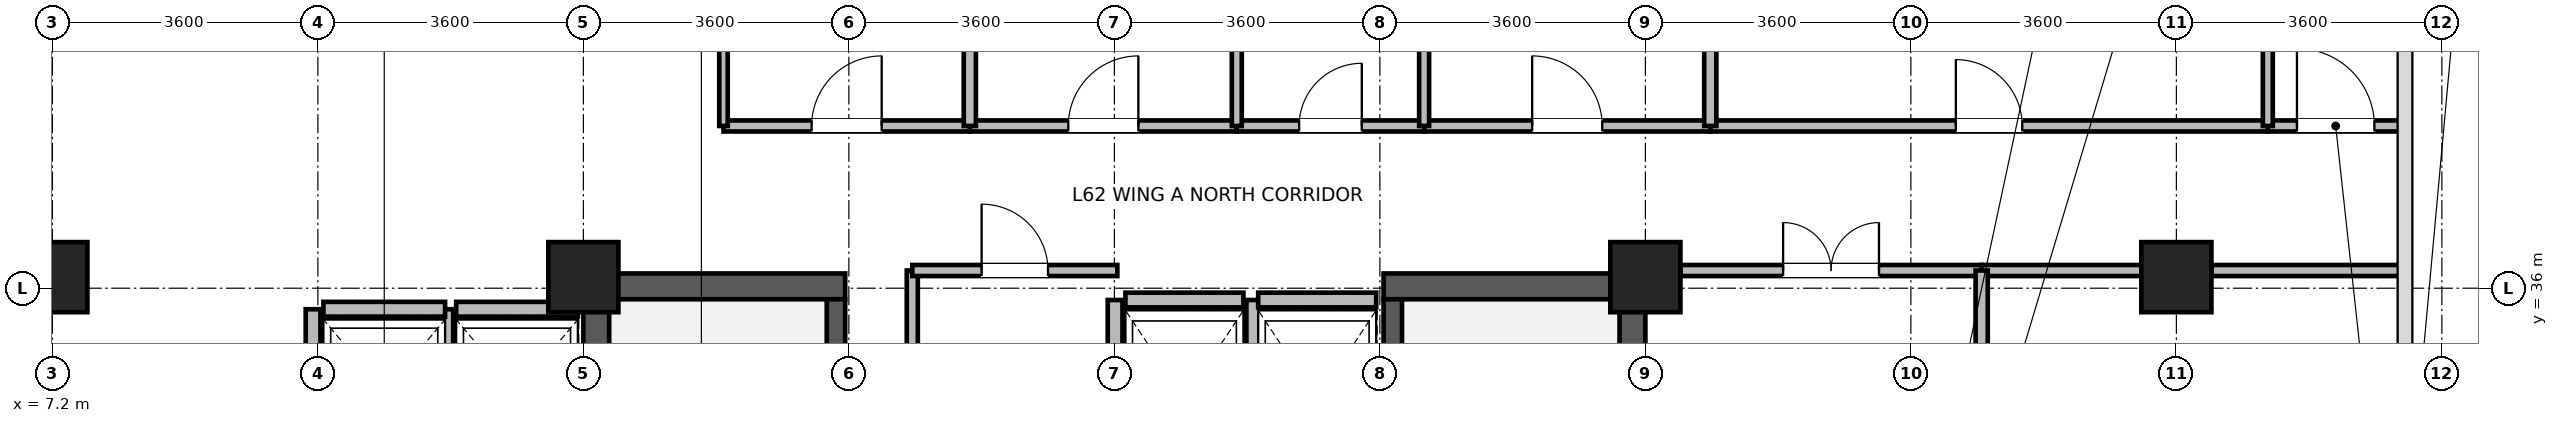
"""IFC4 building model, lengths in metres.
Left out: names, types, materials, properties, quantities, classifications, styles, units other than length and angle.
Written with IfcOpenShell. Run it as: python <this file> out.ifc"""

import sys

from ifc_helpers import new_model, si_unit, direction, frame, frame_2d, origin, origin_2d, place, context, subcontext, project, spatial, rectangle, extrude, source, transform, mapped, element, fill, save


model = new_model("IFC4")
c1 = context("Model", 3, precision=1e-05, world=origin(), true_north=direction((0.0, 1.0)))
c2 = subcontext(c1, "Body", "Model", "MODEL_VIEW")
j1 = project(units=[si_unit("LENGTHUNIT", "METRE"), si_unit("PLANEANGLEUNIT", "RADIAN")], contexts=[c1])
p1 = place(None, origin())
s1 = spatial("IfcSite", under=j1, at=p1, CompositionType="ELEMENT")
p2 = place(p1, origin())
s2 = spatial("IfcBuilding", under=s1, at=p2, CompositionType="ELEMENT")
p3 = place(p2, frame((0.0, 0.0, 242.5)))
s3 = spatial("IfcBuildingStorey", under=s2, at=p3, CompositionType="ELEMENT", Elevation=242.5)
for number, where, z_axis, x_axis in (
    (1, (14.575, 28.5, 0.0), (0.0, 0.0, 1.0), (0.0, 1.0, 0.0)),
    (2, (28.625, 28.5, 0.0), (0.0, 0.0, 1.0), (0.0, 1.0, 0.0)),
):
    element("IfcWall", number, at=place(p3, frame(where, z_axis=z_axis, x_axis=x_axis)), inside=s3, PredefinedType="SHEAR", context=c2, shape_type="SweptSolid", body=[
        extrude(rectangle(XDim=7.7, YDim=0.35, at=frame_2d((3.85, 0.0))), origin(), (0.0, 0.0, 1.0), 3.44),
    ])
for number, where, z_axis, x_axis in (
    (3, (14.75, 36.025, 0.0), (0.0, 0.0, 1.0), (1.0, 0.0, 0.0)),
    (4, (25.25, 36.025, 0.0), (0.0, 0.0, 1.0), (1.0, 0.0, 0.0)),
):
    element("IfcWall", number, at=place(p3, frame(where, z_axis=z_axis, x_axis=x_axis)), inside=s3, PredefinedType="SHEAR", context=c2, shape_type="SweptSolid", body=[
        extrude(rectangle(XDim=3.2, YDim=0.35, at=frame_2d((1.6, 0.0))), origin(), (0.0, 0.0, 1.0), 3.44),
    ])
p4 = place(p3, frame((17.825, 28.85, 0.0), z_axis=(0.0, 0.0, 1.0), x_axis=(0.0, 1.0, 0.0)))
e5 = element("IfcWall", 5, at=p4, inside=s3, PredefinedType="SHEAR", context=c2, shape_type="SweptSolid", body=[
    extrude(rectangle(XDim=7.0, YDim=0.25, at=frame_2d((3.5, 0.0))), origin(), (0.0, 0.0, 1.0), 3.44),
])
p5 = place(p4, frame((0.15, 0.0, 0.0)))
e6 = element("IfcOpeningElement", 6, at=p5, cuts=e5, PredefinedType="OPENING", context=c2, shape_type="SweptSolid", body=[
    extrude(rectangle(XDim=1.1, YDim=2.08, at=frame_2d((0.55, 1.04))), frame((0.0, 0.135, 0.0), z_axis=(0.0, -1.0, 0.0), x_axis=(1.0, 0.0, 0.0)), (0.0, 0.0, 1.0), 0.27),
])
p6 = place(p3, frame((25.375, 28.85, 0.0), z_axis=(0.0, 0.0, 1.0), x_axis=(0.0, 1.0, 0.0)))
e7 = element("IfcWall", 7, at=p6, inside=s3, PredefinedType="SHEAR", context=c2, shape_type="SweptSolid", body=[
    extrude(rectangle(XDim=7.0, YDim=0.25, at=frame_2d((3.5, 0.0))), origin(), (0.0, 0.0, 1.0), 3.44),
])
p7 = place(p6, frame((0.15, 0.0, 0.0)))
e8 = element("IfcOpeningElement", 8, at=p7, cuts=e7, PredefinedType="OPENING", context=c2, shape_type="SweptSolid", body=[
    extrude(rectangle(XDim=1.1, YDim=2.08, at=frame_2d((0.55, 1.04))), frame((0.0, 0.135, 0.0), z_axis=(0.0, -1.0, 0.0), x_axis=(1.0, 0.0, 0.0)), (0.0, 0.0, 1.0), 0.27),
])
m1 = source(origin(), c2, "Body", "SweptSolid", [
    extrude(rectangle(XDim=0.95, YDim=0.95, at=origin_2d()), origin(), (0.0, 0.0, 1.0), 3.7),
])
for number, where, z_axis, x_axis in (
    (9, (7.2, 36.15, 0.0), (0.0, 0.0, 1.0), (1.0, 0.0, 0.0)),
    (10, (14.4, 36.15, 0.0), (0.0, 0.0, 1.0), (1.0, 0.0, 0.0)),
    (11, (28.8, 36.15, 0.0), (0.0, 0.0, 1.0), (1.0, 0.0, 0.0)),
    (12, (36.0, 36.15, 0.0), (0.0, 0.0, 1.0), (1.0, 0.0, 0.0)),
):
    element("IfcColumn", number, at=place(p3, frame(where, z_axis=z_axis, x_axis=x_axis)), inside=s3, PredefinedType="COLUMN", context=c2, shape_type="MappedRepresentation", body=[
        mapped(m1, transform((0.0, 0.0, 0.0), x_axis=(1.0, 0.0, 0.0), y_axis=(0.0, 1.0, 0.0), z_axis=(0.0, 0.0, 1.0), scale=1.0)),
    ])
p8 = place(p3, frame((12.675, 35.715, 0.0), z_axis=(0.0, 0.0, 1.0), x_axis=(1.0, 0.0, 0.0)))
e13 = element("IfcWall", 13, at=p8, inside=s3, PredefinedType="PARTITIONING", context=c2, shape_type="SweptSolid", body=[
    extrude(rectangle(XDim=1.65, YDim=0.2, at=frame_2d((0.825, 0.0))), origin(), (0.0, 0.0, 1.0), 3.42),
])
p9 = place(p3, frame((12.535, 33.485, 0.0), z_axis=(0.0, 0.0, 1.0), x_axis=(0.0, 1.0, 0.0)))
e14 = element("IfcWall", 14, at=p9, inside=s3, PredefinedType="PARTITIONING", context=c2, shape_type="SweptSolid", body=[
    extrude(rectangle(XDim=2.23, YDim=0.2, at=frame_2d((1.115, 0.0))), origin(), (0.0, 0.0, 1.0), 3.42),
])
p10 = place(p3, frame((10.875, 35.715, 0.0), z_axis=(0.0, 0.0, 1.0), x_axis=(1.0, 0.0, 0.0)))
e15 = element("IfcWall", 15, at=p10, inside=s3, PredefinedType="PARTITIONING", context=c2, shape_type="SweptSolid", body=[
    extrude(rectangle(XDim=1.65, YDim=0.2, at=frame_2d((0.825, 0.0))), origin(), (0.0, 0.0, 1.0), 3.42),
])
p11 = place(p3, frame((10.735, 33.485, 0.0), z_axis=(0.0, 0.0, 1.0), x_axis=(0.0, 1.0, 0.0)))
e16 = element("IfcWall", 16, at=p11, inside=s3, PredefinedType="PARTITIONING", context=c2, shape_type="SweptSolid", body=[
    extrude(rectangle(XDim=2.23, YDim=0.2, at=frame_2d((1.115, 0.0))), origin(), (0.0, 0.0, 1.0), 3.42),
])
p12 = place(p3, frame((21.75, 35.84, 0.0), z_axis=(0.0, 0.0, 1.0), x_axis=(1.0, 0.0, 0.0)))
e17 = element("IfcWall", 17, at=p12, inside=s3, PredefinedType="PARTITIONING", context=c2, shape_type="SweptSolid", body=[
    extrude(rectangle(XDim=1.6, YDim=0.2, at=frame_2d((0.8, 0.0))), origin(), (0.0, 0.0, 1.0), 2.52),
])
for number, where, z_axis, x_axis in (
    (18, (21.61, 33.16, 0.0), (0.0, 0.0, 1.0), (0.0, 1.0, 0.0)),
    (19, (23.49, 33.16, 0.0), (0.0, 0.0, 1.0), (0.0, 1.0, 0.0)),
):
    element("IfcWall", number, at=place(p3, frame(where, z_axis=z_axis, x_axis=x_axis)), inside=s3, PredefinedType="PARTITIONING", context=c2, shape_type="SweptSolid", body=[
        extrude(rectangle(XDim=2.68, YDim=0.2, at=frame_2d((1.34, 0.0))), origin(), (0.0, 0.0, 1.0), 3.42),
    ])
p13 = place(p3, frame((23.55, 35.84, 0.0), z_axis=(0.0, 0.0, 1.0), x_axis=(1.0, 0.0, 0.0)))
e20 = element("IfcWall", 20, at=p13, inside=s3, PredefinedType="PARTITIONING", context=c2, shape_type="SweptSolid", body=[
    extrude(rectangle(XDim=1.6, YDim=0.2, at=frame_2d((0.8, 0.0))), origin(), (0.0, 0.0, 1.0), 2.52),
])
p14 = place(p3, frame((29.68, 38.2, 0.0), z_axis=(0.0, 0.0, 1.0), x_axis=(1.0, 0.0, 0.0)))
e21 = element("IfcWall", 21, at=p14, inside=s3, PredefinedType="PARTITIONING", context=c2, shape_type="SweptSolid", body=[
    extrude(rectangle(XDim=7.56, YDim=0.15, at=frame_2d((3.78, 0.0))), origin(), (0.0, 0.0, 1.0), 3.42),
])
p15 = place(p14, frame((3.33, 0.0, 0.0)))
e22 = element("IfcOpeningElement", 22, at=p15, cuts=e21, PredefinedType="OPENING", context=c2, shape_type="SweptSolid", body=[
    extrude(rectangle(XDim=0.9, YDim=2.08, at=frame_2d((0.45, 1.04))), frame((0.0, 0.085, 0.0), z_axis=(0.0, -1.0, 0.0), x_axis=(1.0, 0.0, 0.0)), (0.0, 0.0, 1.0), 0.17),
])
p16 = place(p3, frame((33.36, 36.24, 0.0), z_axis=(0.0, 0.0, 1.0), x_axis=(1.0, 0.0, 0.0)))
e23 = element("IfcWall", 23, at=p16, inside=s3, PredefinedType="PARTITIONING", context=c2, shape_type="SweptSolid", body=[
    extrude(rectangle(XDim=2.165, YDim=0.15, at=frame_2d((1.083, 0.0))), origin(), (0.0, 0.0, 1.0), 2.87),
])
p17 = place(p3, frame((36.475, 36.24, 0.0), z_axis=(0.0, 0.0, 1.0), x_axis=(1.0, 0.0, 0.0)))
e24 = element("IfcWall", 24, at=p17, inside=s3, PredefinedType="PARTITIONING", context=c2, shape_type="SweptSolid", body=[
    extrude(rectangle(XDim=2.605, YDim=0.15, at=frame_2d((1.302, 0.0))), origin(), (0.0, 0.0, 1.0), 3.42),
])
p18 = place(p3, frame((29.275, 36.24, 0.0), z_axis=(0.0, 0.0, 1.0), x_axis=(1.0, 0.0, 0.0)))
e25 = element("IfcWall", 25, at=p18, inside=s3, PredefinedType="PARTITIONING", context=c2, shape_type="SweptSolid", body=[
    extrude(rectangle(XDim=4.085, YDim=0.15, at=frame_2d((2.042, 0.0))), origin(), (0.0, 0.0, 1.0), 2.87),
])
p19 = place(p18, frame((1.393, 0.0, 0.0)))
e26 = element("IfcOpeningElement", 26, at=p19, cuts=e25, PredefinedType="OPENING", context=c2, shape_type="SweptSolid", body=[
    extrude(rectangle(XDim=1.3, YDim=2.12, at=frame_2d((0.65, 1.06))), frame((0.0, 0.085, 0.0), z_axis=(0.0, -1.0, 0.0), x_axis=(1.0, 0.0, 0.0)), (0.0, 0.0, 1.0), 0.17),
])
p20 = place(p3, frame((25.8, 38.2, 0.0), z_axis=(0.0, 0.0, 1.0), x_axis=(1.0, 0.0, 0.0)))
e27 = element("IfcWall", 27, at=p20, inside=s3, PredefinedType="PARTITIONING", context=c2, shape_type="SweptSolid", body=[
    extrude(rectangle(XDim=3.88, YDim=0.15, at=frame_2d((1.94, 0.0))), origin(), (0.0, 0.0, 1.0), 3.42),
])
p21 = place(p20, frame((1.465, 0.0, 0.0)))
e28 = element("IfcOpeningElement", 28, at=p21, cuts=e27, PredefinedType="OPENING", context=c2, shape_type="SweptSolid", body=[
    extrude(rectangle(XDim=0.95, YDim=2.1, at=frame_2d((0.475, 1.05))), frame((0.0, 0.085, 0.0), z_axis=(0.0, -1.0, 0.0), x_axis=(1.0, 0.0, 0.0)), (0.0, 0.0, 1.0), 0.17),
])
p22 = place(p3, frame((19.64, 38.2, 0.0), z_axis=(0.0, 0.0, 1.0), x_axis=(1.0, 0.0, 0.0)))
e29 = element("IfcWall", 29, at=p22, inside=s3, PredefinedType="PARTITIONING", context=c2, shape_type="SweptSolid", body=[
    extrude(rectangle(XDim=3.62, YDim=0.15, at=frame_2d((1.81, 0.0))), origin(), (0.0, 0.0, 1.0), 3.42),
])
p23 = place(p22, frame((1.335, 0.0, 0.0)))
e30 = element("IfcOpeningElement", 30, at=p23, cuts=e29, PredefinedType="OPENING", context=c2, shape_type="SweptSolid", body=[
    extrude(rectangle(XDim=0.95, YDim=2.1, at=frame_2d((0.475, 1.05))), frame((0.0, 0.085, 0.0), z_axis=(0.0, -1.0, 0.0), x_axis=(1.0, 0.0, 0.0)), (0.0, 0.0, 1.0), 0.17),
])
p24 = place(p3, frame((16.3, 38.2, 0.0), z_axis=(0.0, 0.0, 1.0), x_axis=(1.0, 0.0, 0.0)))
e31 = element("IfcWall", 31, at=p24, inside=s3, PredefinedType="PARTITIONING", context=c2, shape_type="SweptSolid", body=[
    extrude(rectangle(XDim=3.34, YDim=0.15, at=frame_2d((1.67, 0.0))), origin(), (0.0, 0.0, 1.0), 3.42),
])
p25 = place(p24, frame((1.195, 0.0, 0.0)))
e32 = element("IfcOpeningElement", 32, at=p25, cuts=e31, PredefinedType="OPENING", context=c2, shape_type="SweptSolid", body=[
    extrude(rectangle(XDim=0.95, YDim=2.1, at=frame_2d((0.475, 1.05))), frame((0.0, 0.085, 0.0), z_axis=(0.0, -1.0, 0.0), x_axis=(1.0, 0.0, 0.0)), (0.0, 0.0, 1.0), 0.17),
])
p26 = place(p3, frame((18.86, 33.36, 0.0), z_axis=(0.0, 0.0, 1.0), x_axis=(0.0, 1.0, 0.0)))
e33 = element("IfcWall", 33, at=p26, inside=s3, PredefinedType="PARTITIONING", context=c2, shape_type="SweptSolid", body=[
    extrude(rectangle(XDim=2.88, YDim=0.15, at=frame_2d((1.44, 0.0))), origin(), (0.0, 0.0, 1.0), 3.42),
])
p27 = place(p3, frame((18.86, 36.24, 0.0), z_axis=(0.0, 0.0, 1.0), x_axis=(1.0, 0.0, 0.0)))
e34 = element("IfcWall", 34, at=p27, inside=s3, PredefinedType="PARTITIONING", context=c2, shape_type="SweptSolid", body=[
    extrude(rectangle(XDim=2.78, YDim=0.15, at=frame_2d((1.39, 0.0))), origin(), (0.0, 0.0, 1.0), 2.52),
])
p28 = place(p27, frame((0.94, 0.0, 0.0)))
e35 = element("IfcOpeningElement", 35, at=p28, cuts=e34, PredefinedType="OPENING", context=c2, shape_type="SweptSolid", body=[
    extrude(rectangle(XDim=0.9, YDim=2.08, at=frame_2d((0.45, 1.04))), frame((0.0, 0.085, 0.0), z_axis=(0.0, -1.0, 0.0), x_axis=(1.0, 0.0, 0.0)), (0.0, 0.0, 1.0), 0.17),
])
p29 = place(p3, frame((23.26, 38.2, 0.0), z_axis=(0.0, 0.0, 1.0), x_axis=(1.0, 0.0, 0.0)))
e36 = element("IfcWall", 36, at=p29, inside=s3, PredefinedType="PARTITIONING", context=c2, shape_type="SweptSolid", body=[
    extrude(rectangle(XDim=2.54, YDim=0.15, at=frame_2d((1.27, 0.0))), origin(), (0.0, 0.0, 1.0), 3.42),
])
p30 = place(p29, frame((0.845, 0.0, 0.0)))
e37 = element("IfcOpeningElement", 37, at=p30, cuts=e36, PredefinedType="OPENING", context=c2, shape_type="SweptSolid", body=[
    extrude(rectangle(XDim=0.85, YDim=2.04, at=frame_2d((0.425, 1.02))), frame((0.0, 0.085, 0.0), z_axis=(0.0, -1.0, 0.0), x_axis=(1.0, 0.0, 0.0)), (0.0, 0.0, 1.0), 0.17),
])
p31 = place(p3, frame((37.24, 38.2, 0.0), z_axis=(0.0, 0.0, 1.0), x_axis=(1.0, 0.0, 0.0)))
e38 = element("IfcWall", 38, at=p31, inside=s3, PredefinedType="PARTITIONING", context=c2, shape_type="SweptSolid", body=[
    extrude(rectangle(XDim=1.84, YDim=0.15, at=frame_2d((0.92, 0.0))), origin(), (0.0, 0.0, 1.0), 3.42),
])
p32 = place(p31, frame((0.395, 0.0, 0.0)))
e39 = element("IfcOpeningElement", 39, at=p32, cuts=e38, PredefinedType="OPENING", context=c2, shape_type="SweptSolid", body=[
    extrude(rectangle(XDim=1.05, YDim=2.12, at=frame_2d((0.525, 1.06))), frame((0.0, 0.085, 0.0), z_axis=(0.0, -1.0, 0.0), x_axis=(1.0, 0.0, 0.0)), (0.0, 0.0, 1.0), 0.17),
])
p33 = place(p3, frame((16.3, 38.2, 0.0), z_axis=(0.0, 0.0, 1.0), x_axis=(0.0, 1.0, 0.0)))
e40 = element("IfcWall", 40, at=p33, inside=s3, PredefinedType="PARTITIONING", context=c2, shape_type="SweptSolid", body=[
    extrude(rectangle(XDim=1.268, YDim=0.115, at=frame_2d((0.634, 0.0))), origin(), (0.0, 0.0, 1.0), 3.42),
])
p34 = place(p3, frame((19.64, 38.2, 0.0), z_axis=(0.0, 0.0, 1.0), x_axis=(0.0, 1.0, 0.0)))
e41 = element("IfcWall", 41, at=p34, inside=s3, PredefinedType="PARTITIONING", context=c2, shape_type="SweptSolid", body=[
    extrude(rectangle(XDim=4.868, YDim=0.165, at=frame_2d((2.434, 0.0))), origin(), (0.0, 0.0, 1.0), 3.42),
])
for number, where, z_axis, x_axis in (
    (42, (23.26, 38.2, 0.0), (0.0, 0.0, 1.0), (0.0, 1.0, 0.0)),
    (43, (25.8, 38.2, 0.0), (0.0, 0.0, 1.0), (0.0, 1.0, 0.0)),
):
    element("IfcWall", number, at=place(p3, frame(where, z_axis=z_axis, x_axis=x_axis)), inside=s3, PredefinedType="PARTITIONING", context=c2, shape_type="SweptSolid", body=[
        extrude(rectangle(XDim=4.868, YDim=0.135, at=frame_2d((2.434, 0.0))), origin(), (0.0, 0.0, 1.0), 3.42),
    ])
p35 = place(p3, frame((29.68, 38.2, 0.0), z_axis=(0.0, 0.0, 1.0), x_axis=(0.0, 1.0, 0.0)))
e44 = element("IfcWall", 44, at=p35, inside=s3, PredefinedType="PARTITIONING", context=c2, shape_type="SweptSolid", body=[
    extrude(rectangle(XDim=4.868, YDim=0.165, at=frame_2d((2.434, 0.0))), origin(), (0.0, 0.0, 1.0), 3.42),
])
p36 = place(p3, frame((37.24, 38.2, 0.0), z_axis=(0.0, 0.0, 1.0), x_axis=(0.0, 1.0, 0.0)))
e45 = element("IfcWall", 45, at=p36, inside=s3, PredefinedType="PARTITIONING", context=c2, shape_type="SweptSolid", body=[
    extrude(rectangle(XDim=4.868, YDim=0.135, at=frame_2d((2.434, 0.0))), origin(), (0.0, 0.0, 1.0), 3.42),
])
p37 = place(p3, frame((33.36, 31.64, 0.0), z_axis=(0.0, 0.0, 1.0), x_axis=(0.0, 1.0, 0.0)))
e46 = element("IfcWall", 46, at=p37, inside=s3, PredefinedType="PARTITIONING", context=c2, shape_type="SweptSolid", body=[
    extrude(rectangle(XDim=4.6, YDim=0.165, at=frame_2d((2.3, 0.0))), origin(), (0.0, 0.0, 1.0), 3.42),
])
p38 = place(p15, origin())
e47 = element("IfcDoor", 47, at=p38, inside=s3, OperationType="SINGLE_SWING_LEFT", PredefinedType="DOOR", context=c2, shape_type="SweptSolid", body=[
    extrude(rectangle(XDim=0.9, YDim=2.08, at=frame_2d((0.45, 1.04))), frame((0.0, 0.025, 0.0), z_axis=(0.0, -1.0, 0.0), x_axis=(1.0, 0.0, 0.0)), (0.0, 0.0, 1.0), 0.05),
])
fill(e22, e47)
p39 = place(p19, origin())
e48 = element("IfcDoor", 48, at=p39, inside=s3, OperationType="DOUBLE_DOOR_SINGLE_SWING", PredefinedType="DOOR", context=c2, shape_type="SweptSolid", body=[
    extrude(rectangle(XDim=1.3, YDim=2.12, at=frame_2d((0.65, 1.06))), frame((0.0, 0.025, 0.0), z_axis=(0.0, -1.0, 0.0), x_axis=(1.0, 0.0, 0.0)), (0.0, 0.0, 1.0), 0.05),
])
fill(e26, e48)
p40 = place(p21, origin())
e49 = element("IfcDoor", 49, at=p40, inside=s3, OperationType="SINGLE_SWING_LEFT", PredefinedType="DOOR", context=c2, shape_type="SweptSolid", body=[
    extrude(rectangle(XDim=0.95, YDim=2.1, at=frame_2d((0.475, 1.05))), frame((0.0, 0.025, 0.0), z_axis=(0.0, -1.0, 0.0), x_axis=(1.0, 0.0, 0.0)), (0.0, 0.0, 1.0), 0.05),
])
fill(e28, e49)
p41 = place(p23, origin())
e50 = element("IfcDoor", 50, at=p41, inside=s3, OperationType="SINGLE_SWING_RIGHT", PredefinedType="DOOR", context=c2, shape_type="SweptSolid", body=[
    extrude(rectangle(XDim=0.95, YDim=2.1, at=frame_2d((0.475, 1.05))), frame((0.0, 0.025, 0.0), z_axis=(0.0, -1.0, 0.0), x_axis=(1.0, 0.0, 0.0)), (0.0, 0.0, 1.0), 0.05),
])
fill(e30, e50)
p42 = place(p25, origin())
e51 = element("IfcDoor", 51, at=p42, inside=s3, OperationType="SINGLE_SWING_RIGHT", PredefinedType="DOOR", context=c2, shape_type="SweptSolid", body=[
    extrude(rectangle(XDim=0.95, YDim=2.1, at=frame_2d((0.475, 1.05))), frame((0.0, 0.025, 0.0), z_axis=(0.0, -1.0, 0.0), x_axis=(1.0, 0.0, 0.0)), (0.0, 0.0, 1.0), 0.05),
])
fill(e32, e51)
p43 = place(p28, origin())
e52 = element("IfcDoor", 52, at=p43, inside=s3, OperationType="SINGLE_SWING_LEFT", PredefinedType="DOOR", context=c2, shape_type="SweptSolid", body=[
    extrude(rectangle(XDim=0.9, YDim=2.08, at=frame_2d((0.45, 1.04))), frame((0.0, 0.025, 0.0), z_axis=(0.0, -1.0, 0.0), x_axis=(1.0, 0.0, 0.0)), (0.0, 0.0, 1.0), 0.05),
])
fill(e35, e52)
p44 = place(p30, origin())
e53 = element("IfcDoor", 53, at=p44, inside=s3, OperationType="SINGLE_SWING_RIGHT", PredefinedType="DOOR", context=c2, shape_type="SweptSolid", body=[
    extrude(rectangle(XDim=0.85, YDim=2.04, at=frame_2d((0.425, 1.02))), frame((0.0, 0.025, 0.0), z_axis=(0.0, -1.0, 0.0), x_axis=(1.0, 0.0, 0.0)), (0.0, 0.0, 1.0), 0.05),
])
fill(e37, e53)
p45 = place(p32, origin())
e54 = element("IfcDoor", 54, at=p45, inside=s3, OperationType="SINGLE_SWING_LEFT", PredefinedType="DOOR", context=c2, shape_type="SweptSolid", body=[
    extrude(rectangle(XDim=1.05, YDim=2.12, at=frame_2d((0.525, 1.06))), frame((0.0, 0.025, 0.0), z_axis=(0.0, -1.0, 0.0), x_axis=(1.0, 0.0, 0.0)), (0.0, 0.0, 1.0), 0.05),
])
fill(e39, e54)
save(model, sys.argv[1])
